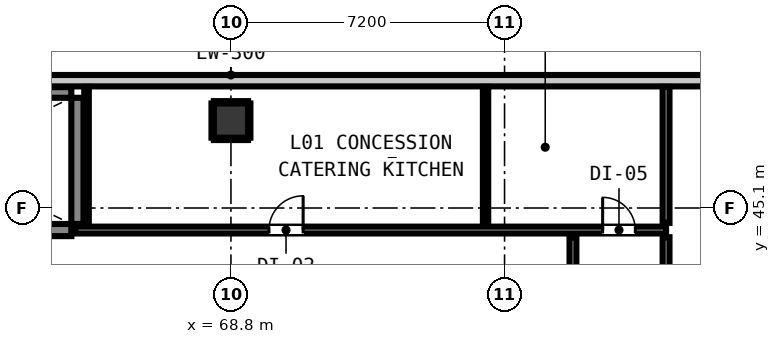
"""IFC4 building model, lengths in metres.
Left out: names, types, materials, properties, quantities, classifications, styles, units other than length and angle.
Written with IfcOpenShell. Run it as: python <this file> out.ifc"""

import sys

from ifc_helpers import new_model, si_unit, direction, frame, frame_2d, origin, origin_2d, place, context, subcontext, project, spatial, rectangle, circle, extrude, element, fill, save


model = new_model("IFC4")
c1 = context("Model", 3, precision=1e-05, world=origin(), true_north=direction((0.0, 1.0)))
c2 = subcontext(c1, "Body", "Model", "MODEL_VIEW")
j1 = project(units=[si_unit("LENGTHUNIT", "METRE"), si_unit("PLANEANGLEUNIT", "RADIAN")], contexts=[c1])
p1 = place(None, origin())
s1 = spatial("IfcSite", under=j1, at=p1, CompositionType="ELEMENT")
p2 = place(p1, origin())
s2 = spatial("IfcBuilding", under=s1, at=p2, CompositionType="ELEMENT")
p3 = place(p2, frame((0.0, 0.0, 5.2)))
s3 = spatial("IfcBuildingStorey", under=s2, at=p3, CompositionType="ELEMENT", Elevation=5.2)
p4 = place(p3, frame((64.76, 44.68, 0.0), z_axis=(0.0, 0.0, 1.0), x_axis=(0.0, 1.0, 0.0)))
e1 = element("IfcWall", 1, at=p4, inside=s3, PredefinedType="SHEAR", context=c2, shape_type="SweptSolid", body=[
    extrude(rectangle(XDim=3.32, YDim=0.32, at=frame_2d((1.66, 0.0))), origin(), (0.0, 0.0, 1.0), 4.2),
])
p5 = place(p3, frame((56.2, 48.14, 0.0), z_axis=(0.0, 0.0, 1.0), x_axis=(1.0, 0.0, 0.0)))
e2 = element("IfcWall", 2, at=p5, inside=s3, PredefinedType="SHEAR", context=c2, shape_type="SweptSolid", body=[
    extrude(rectangle(XDim=8.4, YDim=0.28, at=frame_2d((4.2, 0.0))), origin(), (0.0, 0.0, 1.0), 4.2),
])
p6 = place(p3, frame((56.2, 44.52, 0.0), z_axis=(0.0, 0.0, 1.0), x_axis=(1.0, 0.0, 0.0)))
e3 = element("IfcWall", 3, at=p6, inside=s3, PredefinedType="SHEAR", context=c2, shape_type="SweptSolid", body=[
    extrude(rectangle(XDim=8.4, YDim=0.32, at=frame_2d((4.2, 0.0))), origin(), (0.0, 0.0, 1.0), 4.2),
])
p7 = place(p6, frame((0.23, 0.0, 0.0)))
e4 = element("IfcOpeningElement", 4, at=p7, cuts=e3, PredefinedType="OPENING", context=c2, shape_type="SweptSolid", body=[
    extrude(rectangle(XDim=1.1, YDim=2.15, at=frame_2d((0.55, 1.075))), frame((0.0, 0.17, 0.0), z_axis=(0.0, -1.0, 0.0), x_axis=(1.0, 0.0, 0.0)), (0.0, 0.0, 1.0), 0.34),
])
p8 = place(p3, frame((68.8, 47.4, 0.0), z_axis=(0.0, 0.0, 1.0), x_axis=(1.0, 0.0, 0.0)))
e5 = element("IfcColumn", 5, at=p8, inside=s3, PredefinedType="COLUMN", context=c2, shape_type="SweptSolid", body=[
    extrude(circle(Radius=0.45, at=origin_2d()), origin(), (0.0, 0.0, 1.0), 4.2),
])
p9 = place(p3, frame((54.55, 48.45, 0.0), z_axis=(0.0, 0.0, 1.0), x_axis=(1.0, 0.0, 0.0)))
e6 = element("IfcWall", 6, at=p9, inside=s3, PredefinedType="STANDARD", context=c2, shape_type="SweptSolid", body=[
    extrude(rectangle(XDim=28.5, YDim=0.3, at=frame_2d((14.25, 0.0))), origin(), (0.0, 0.0, 1.0), 3.92),
])
p10 = place(p3, frame((64.7, 44.52, 0.0), z_axis=(0.0, 0.0, 1.0), x_axis=(1.0, 0.0, 0.0)))
e7 = element("IfcWall", 7, at=p10, inside=s3, PredefinedType="PARTITIONING", context=c2, shape_type="SweptSolid", body=[
    extrude(rectangle(XDim=15.55, YDim=0.18, at=frame_2d((7.775, 0.0))), origin(), (0.0, 0.0, 1.0), 3.92),
])
p11 = place(p10, frame((5.1, 0.0, 0.0)))
e8 = element("IfcOpeningElement", 8, at=p11, cuts=e7, PredefinedType="OPENING", context=c2, shape_type="SweptSolid", body=[
    extrude(rectangle(XDim=0.9, YDim=2.1, at=frame_2d((0.45, 1.05))), frame((0.0, 0.1, 0.0), z_axis=(0.0, -1.0, 0.0), x_axis=(1.0, 0.0, 0.0)), (0.0, 0.0, 1.0), 0.2),
])
p12 = place(p10, frame((13.881, 0.0, 0.0)))
e9 = element("IfcOpeningElement", 9, at=p12, cuts=e7, PredefinedType="OPENING", context=c2, shape_type="SweptSolid", body=[
    extrude(rectangle(XDim=0.86, YDim=2.02, at=frame_2d((0.43, 1.01))), frame((0.0, 0.1, 0.0), z_axis=(0.0, -1.0, 0.0), x_axis=(1.0, 0.0, 0.0)), (0.0, 0.0, 1.0), 0.2),
])
p13 = place(p3, frame((77.8, 40.788, 0.0), z_axis=(0.0, 0.0, 1.0), x_axis=(0.0, 1.0, 0.0)))
e10 = element("IfcWall", 10, at=p13, inside=s3, PredefinedType="PARTITIONING", context=c2, shape_type="SweptSolid", body=[
    extrude(rectangle(XDim=3.544, YDim=0.18, at=frame_2d((1.772, 0.0))), origin(), (0.0, 0.0, 1.0), 3.92),
])
p14 = place(p13, frame((1.048, 0.0, 0.0)))
e11 = element("IfcOpeningElement", 11, at=p14, cuts=e10, PredefinedType="OPENING", context=c2, shape_type="SweptSolid", body=[
    extrude(rectangle(XDim=1.4, YDim=2.15, at=frame_2d((0.7, 1.075))), frame((0.0, 0.1, 0.0), z_axis=(0.0, -1.0, 0.0), x_axis=(1.0, 0.0, 0.0)), (0.0, 0.0, 1.0), 0.2),
])
p15 = place(p3, frame((80.25, 18.645, 0.0), z_axis=(0.0, 0.0, 1.0), x_axis=(0.0, 1.0, 0.0)))
e12 = element("IfcWall", 12, at=p15, inside=s3, PredefinedType="PARTITIONING", context=c2, shape_type="SweptSolid", body=[
    extrude(rectangle(XDim=25.687, YDim=0.18, at=frame_2d((12.844, 0.0))), origin(), (0.0, 0.0, 1.0), 3.92),
])
p16 = place(p3, frame((80.25, 44.708, 0.0), z_axis=(0.0, 0.0, 1.0), x_axis=(0.0, 1.0, 0.0)))
e13 = element("IfcWall", 13, at=p16, inside=s3, PredefinedType="PARTITIONING", context=c2, shape_type="SweptSolid", body=[
    extrude(rectangle(XDim=3.58, YDim=0.18, at=frame_2d((1.79, 0.0))), origin(), (0.0, 0.0, 1.0), 3.92),
])
p17 = place(p3, frame((75.5, 44.688, 0.0), z_axis=(0.0, 0.0, 1.0), x_axis=(0.0, 1.0, 0.0)))
e14 = element("IfcWall", 14, at=p17, inside=s3, PredefinedType="PARTITIONING", context=c2, shape_type="SweptSolid", body=[
    extrude(rectangle(XDim=3.6, YDim=0.14, at=frame_2d((1.8, 0.0))), origin(), (0.0, 0.0, 1.0), 3.92),
])
p18 = place(p3, frame((65.0, 44.678, 0.0), z_axis=(0.0, 0.0, 1.0), x_axis=(0.0, 1.0, 0.0)))
e15 = element("IfcWall", 15, at=p18, inside=s3, PredefinedType="PARTITIONING", context=c2, shape_type="SweptSolid", body=[
    extrude(rectangle(XDim=3.61, YDim=0.12, at=frame_2d((1.805, 0.0))), origin(), (0.0, 0.0, 1.0), 3.92),
])
for number, where, z_axis, x_axis in (
    (16, (68.35, 46.918, 0.0), (0.0, 0.0, 1.0), (1.0, 0.0, 0.0)),
    (17, (68.35, 47.882, 0.0), (0.0, 0.0, 1.0), (1.0, 0.0, 0.0)),
):
    element("IfcWall", number, at=place(p3, frame(where, z_axis=z_axis, x_axis=x_axis)), inside=s3, PredefinedType="PARTITIONING", context=c2, shape_type="SweptSolid", body=[
        extrude(rectangle(XDim=0.9, YDim=0.06, at=frame_2d((0.45, 0.0))), origin(), (0.0, 0.0, 1.0), 1.45),
    ])
for number, where, z_axis, x_axis in (
    (18, (68.318, 46.95, 0.0), (0.0, 0.0, 1.0), (0.0, 1.0, 0.0)),
    (19, (69.282, 46.95, 0.0), (0.0, 0.0, 1.0), (0.0, 1.0, 0.0)),
):
    element("IfcWall", number, at=place(p3, frame(where, z_axis=z_axis, x_axis=x_axis)), inside=s3, PredefinedType="PARTITIONING", context=c2, shape_type="SweptSolid", body=[
        extrude(rectangle(XDim=0.9, YDim=0.06, at=frame_2d((0.45, 0.0))), origin(), (0.0, 0.0, 1.0), 1.45),
    ])
p19 = place(p11, origin())
e20 = element("IfcDoor", 20, at=p19, inside=s3, OperationType="SINGLE_SWING_RIGHT", PredefinedType="DOOR", context=c2, shape_type="SweptSolid", body=[
    extrude(rectangle(XDim=0.9, YDim=2.1, at=frame_2d((0.45, 1.05))), frame((0.0, 0.025, 0.0), z_axis=(0.0, -1.0, 0.0), x_axis=(1.0, 0.0, 0.0)), (0.0, 0.0, 1.0), 0.05),
])
fill(e8, e20)
p20 = place(p12, origin())
e21 = element("IfcDoor", 21, at=p20, inside=s3, OperationType="SINGLE_SWING_LEFT", PredefinedType="DOOR", context=c2, shape_type="SweptSolid", body=[
    extrude(rectangle(XDim=0.86, YDim=2.02, at=frame_2d((0.43, 1.01))), frame((0.0, 0.025, 0.0), z_axis=(0.0, -1.0, 0.0), x_axis=(1.0, 0.0, 0.0)), (0.0, 0.0, 1.0), 0.05),
])
fill(e9, e21)
save(model, sys.argv[1])
